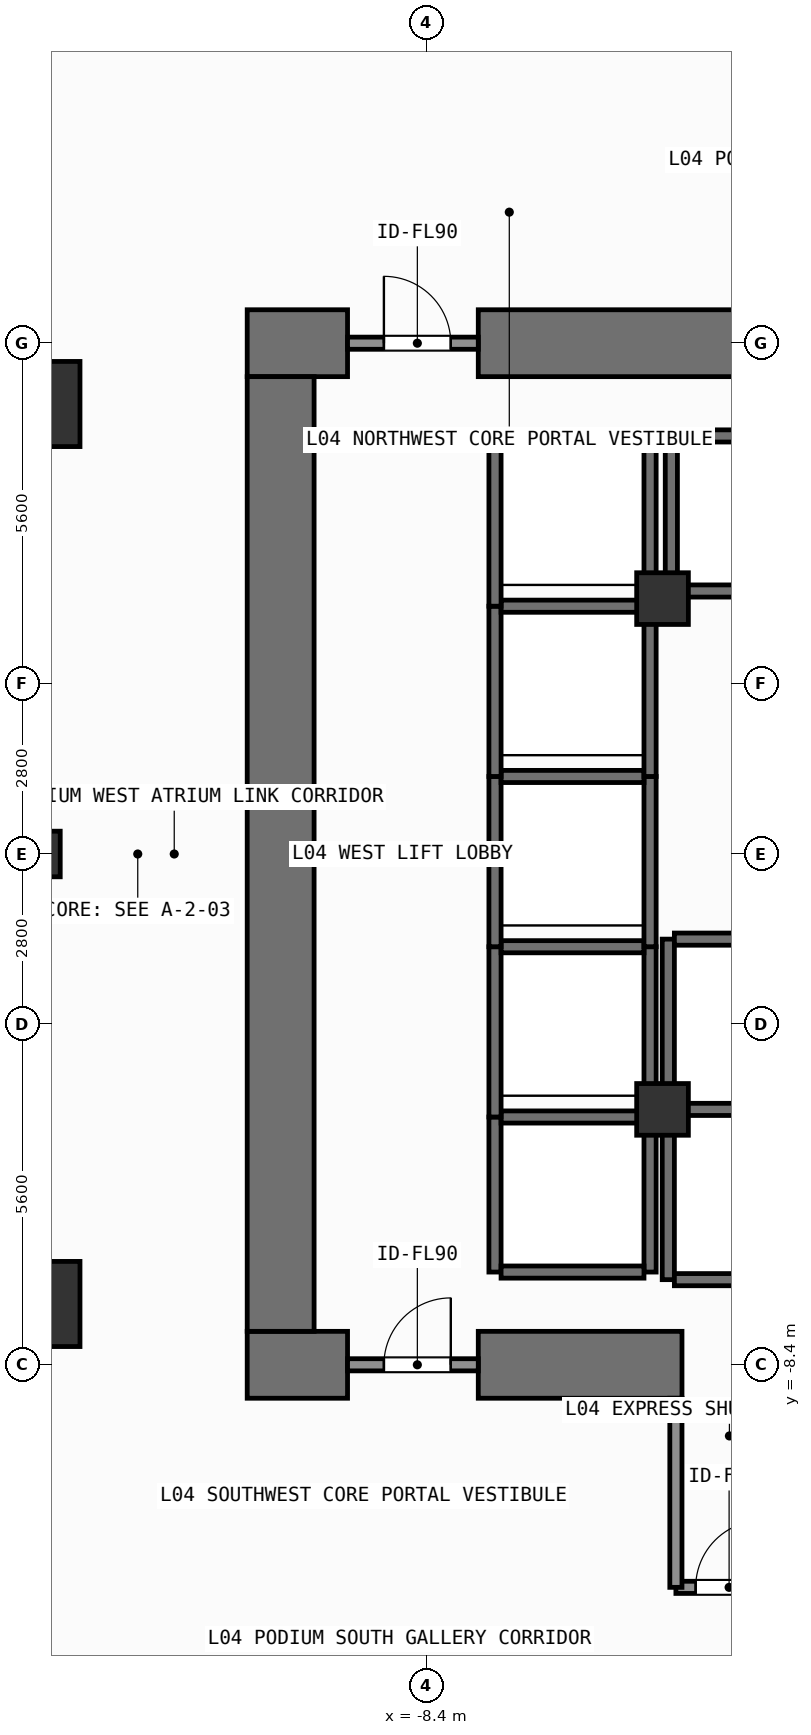
"""IFC4 building model, lengths in metres.
Left out: names, types, materials, properties, quantities, classifications, styles, units other than length and angle.
Written with IfcOpenShell. Run it as: python <this file> out.ifc"""

import sys

from ifc_helpers import new_model, si_unit, direction, frame, frame_2d, origin, origin_2d, place, context, subcontext, project, spatial, rectangle, extrude, element, fill, save


model = new_model("IFC4")
c1 = context("Model", 3, precision=1e-05, world=origin(), true_north=direction((0.0, 1.0)))
c2 = subcontext(c1, "Body", "Model", "MODEL_VIEW")
j1 = project(units=[si_unit("LENGTHUNIT", "METRE"), si_unit("PLANEANGLEUNIT", "RADIAN")], contexts=[c1])
p1 = place(None, origin())
s1 = spatial("IfcSite", under=j1, at=p1, CompositionType="ELEMENT")
p2 = place(p1, origin())
s2 = spatial("IfcBuilding", under=s1, at=p2, CompositionType="ELEMENT")
p3 = place(p2, frame((0.0, 0.0, 13.2)))
s3 = spatial("IfcBuildingStorey", under=s2, at=p3, CompositionType="ELEMENT", Elevation=13.2)
p4 = place(p3, frame((-11.35, -8.4, 0.0), z_axis=(0.0, 0.0, 1.0), x_axis=(1.0, 0.0, 0.0)))
e1 = element("IfcWall", 1, at=p4, inside=s3, PredefinedType="SHEAR", context=c2, shape_type="SweptSolid", body=[
    extrude(rectangle(XDim=1.65, YDim=1.1, at=frame_2d((0.825, 0.0))), origin(), (0.0, 0.0, 1.0), 4.2),
])
p5 = place(p3, frame((-7.55, -8.4, 0.0), z_axis=(0.0, 0.0, 1.0), x_axis=(1.0, 0.0, 0.0)))
e2 = element("IfcWall", 2, at=p5, inside=s3, PredefinedType="SHEAR", context=c2, shape_type="SweptSolid", body=[
    extrude(rectangle(XDim=3.35, YDim=1.1, at=frame_2d((1.675, 0.0))), origin(), (0.0, 0.0, 1.0), 4.2),
])
p6 = place(p3, frame((-11.35, 8.4, 0.0), z_axis=(0.0, 0.0, 1.0), x_axis=(1.0, 0.0, 0.0)))
e3 = element("IfcWall", 3, at=p6, inside=s3, PredefinedType="SHEAR", context=c2, shape_type="SweptSolid", body=[
    extrude(rectangle(XDim=1.65, YDim=1.1, at=frame_2d((0.825, 0.0))), origin(), (0.0, 0.0, 1.0), 4.2),
])
p7 = place(p3, frame((-7.55, 8.4, 0.0), z_axis=(0.0, 0.0, 1.0), x_axis=(1.0, 0.0, 0.0)))
e4 = element("IfcWall", 4, at=p7, inside=s3, PredefinedType="SHEAR", context=c2, shape_type="SweptSolid", body=[
    extrude(rectangle(XDim=16.5, YDim=1.1, at=frame_2d((8.25, 0.0))), origin(), (0.0, 0.0, 1.0), 4.2),
])
p8 = place(p3, frame((-10.8, -7.85, 0.0), z_axis=(0.0, 0.0, 1.0), x_axis=(0.0, 1.0, 0.0)))
e5 = element("IfcWall", 5, at=p8, inside=s3, PredefinedType="SHEAR", context=c2, shape_type="SweptSolid", body=[
    extrude(rectangle(XDim=15.7, YDim=1.1, at=frame_2d((7.85, 0.0))), origin(), (0.0, 0.0, 1.0), 4.2),
])
for number, where, z_axis, x_axis in (
    (6, (-14.8, -7.4, 0.0), (0.0, 0.0, 1.0), (1.0, 0.0, 0.0)),
    (7, (-14.8, 7.4, 0.0), (0.0, 0.0, 1.0), (1.0, 0.0, 0.0)),
):
    element("IfcColumn", number, at=place(p3, frame(where, z_axis=z_axis, x_axis=x_axis)), inside=s3, PredefinedType="COLUMN", context=c2, shape_type="SweptSolid", body=[
        extrude(rectangle(XDim=1.4, YDim=1.4, at=origin_2d()), origin(), (0.0, 0.0, 1.0), 4.2),
    ])
for number, where, z_axis, x_axis in (
    (8, (-4.52, -4.2, 0.0), (0.0, 0.0, 1.0), (1.0, 0.0, 0.0)),
    (9, (-4.52, 4.2, 0.0), (0.0, 0.0, 1.0), (1.0, 0.0, 0.0)),
):
    element("IfcColumn", number, at=place(p3, frame(where, z_axis=z_axis, x_axis=x_axis)), inside=s3, PredefinedType="COLUMN", context=c2, shape_type="SweptSolid", body=[
        extrude(rectangle(XDim=0.85, YDim=0.85, at=origin_2d()), origin(), (0.0, 0.0, 1.0), 4.2),
    ])
p9 = place(p3, frame((-14.8, 0.0, 0.0), z_axis=(0.0, 0.0, 1.0), x_axis=(1.0, 0.0, 0.0)))
e10 = element("IfcColumn", 10, at=p9, inside=s3, PredefinedType="COLUMN", context=c2, shape_type="SweptSolid", body=[
    extrude(rectangle(XDim=0.75, YDim=0.75, at=origin_2d()), origin(), (0.0, 0.0, 1.0), 4.2),
])
for number, where, z_axis, x_axis in (
    (11, (-7.275, -6.875, 0.0), (0.0, 0.0, 1.0), (0.0, 1.0, 0.0)),
    (12, (-4.725, -6.875, 0.0), (0.0, 0.0, 1.0), (0.0, 1.0, 0.0)),
):
    element("IfcWall", number, at=place(p3, frame(where, z_axis=z_axis, x_axis=x_axis)), inside=s3, PredefinedType="SHEAR", context=c2, shape_type="SweptSolid", body=[
        extrude(rectangle(XDim=2.55, YDim=0.2, at=frame_2d((1.275, 0.0))), origin(), (0.0, 0.0, 1.0), 3.96),
    ])
for number, where, z_axis, x_axis in (
    (13, (-7.175, -6.875, 0.0), (0.0, 0.0, 1.0), (1.0, 0.0, 0.0)),
    (14, (-7.175, -4.325, 0.0), (0.0, 0.0, 1.0), (1.0, 0.0, 0.0)),
):
    element("IfcWall", number, at=place(p3, frame(where, z_axis=z_axis, x_axis=x_axis)), inside=s3, PredefinedType="SHEAR", context=c2, shape_type="SweptSolid", body=[
        extrude(rectangle(XDim=2.35, YDim=0.2, at=frame_2d((1.175, 0.0))), origin(), (0.0, 0.0, 1.0), 3.96),
    ])
for number, where, z_axis, x_axis in (
    (15, (-7.275, -4.325, 0.0), (0.0, 0.0, 1.0), (0.0, 1.0, 0.0)),
    (16, (-4.725, -4.325, 0.0), (0.0, 0.0, 1.0), (0.0, 1.0, 0.0)),
):
    element("IfcWall", number, at=place(p3, frame(where, z_axis=z_axis, x_axis=x_axis)), inside=s3, PredefinedType="SHEAR", context=c2, shape_type="SweptSolid", body=[
        extrude(rectangle(XDim=2.8, YDim=0.2, at=frame_2d((1.4, 0.0))), origin(), (0.0, 0.0, 1.0), 3.96),
    ])
p10 = place(p3, frame((-7.175, -1.525, 0.0), z_axis=(0.0, 0.0, 1.0), x_axis=(1.0, 0.0, 0.0)))
e17 = element("IfcWall", 17, at=p10, inside=s3, PredefinedType="SHEAR", context=c2, shape_type="SweptSolid", body=[
    extrude(rectangle(XDim=2.35, YDim=0.2, at=frame_2d((1.175, 0.0))), origin(), (0.0, 0.0, 1.0), 3.96),
])
for number, where, z_axis, x_axis in (
    (18, (-7.275, -1.525, 0.0), (0.0, 0.0, 1.0), (0.0, 1.0, 0.0)),
    (19, (-4.725, -1.525, 0.0), (0.0, 0.0, 1.0), (0.0, 1.0, 0.0)),
):
    element("IfcWall", number, at=place(p3, frame(where, z_axis=z_axis, x_axis=x_axis)), inside=s3, PredefinedType="SHEAR", context=c2, shape_type="SweptSolid", body=[
        extrude(rectangle(XDim=2.8, YDim=0.2, at=frame_2d((1.4, 0.0))), origin(), (0.0, 0.0, 1.0), 3.96),
    ])
p11 = place(p3, frame((-7.175, 1.275, 0.0), z_axis=(0.0, 0.0, 1.0), x_axis=(1.0, 0.0, 0.0)))
e20 = element("IfcWall", 20, at=p11, inside=s3, PredefinedType="SHEAR", context=c2, shape_type="SweptSolid", body=[
    extrude(rectangle(XDim=2.35, YDim=0.2, at=frame_2d((1.175, 0.0))), origin(), (0.0, 0.0, 1.0), 3.96),
])
for number, where, z_axis, x_axis in (
    (21, (-7.275, 1.275, 0.0), (0.0, 0.0, 1.0), (0.0, 1.0, 0.0)),
    (22, (-4.725, 1.275, 0.0), (0.0, 0.0, 1.0), (0.0, 1.0, 0.0)),
):
    element("IfcWall", number, at=place(p3, frame(where, z_axis=z_axis, x_axis=x_axis)), inside=s3, PredefinedType="SHEAR", context=c2, shape_type="SweptSolid", body=[
        extrude(rectangle(XDim=2.8, YDim=0.2, at=frame_2d((1.4, 0.0))), origin(), (0.0, 0.0, 1.0), 3.96),
    ])
p12 = place(p3, frame((-7.175, 4.075, 0.0), z_axis=(0.0, 0.0, 1.0), x_axis=(1.0, 0.0, 0.0)))
e23 = element("IfcWall", 23, at=p12, inside=s3, PredefinedType="SHEAR", context=c2, shape_type="SweptSolid", body=[
    extrude(rectangle(XDim=2.35, YDim=0.2, at=frame_2d((1.175, 0.0))), origin(), (0.0, 0.0, 1.0), 3.96),
])
for number, where, z_axis, x_axis in (
    (24, (-7.275, 4.075, 0.0), (0.0, 0.0, 1.0), (0.0, 1.0, 0.0)),
    (25, (-4.725, 4.075, 0.0), (0.0, 0.0, 1.0), (0.0, 1.0, 0.0)),
):
    element("IfcWall", number, at=place(p3, frame(where, z_axis=z_axis, x_axis=x_axis)), inside=s3, PredefinedType="SHEAR", context=c2, shape_type="SweptSolid", body=[
        extrude(rectangle(XDim=2.8, YDim=0.2, at=frame_2d((1.4, 0.0))), origin(), (0.0, 0.0, 1.0), 3.96),
    ])
p13 = place(p3, frame((-7.175, 6.875, 0.0), z_axis=(0.0, 0.0, 1.0), x_axis=(1.0, 0.0, 0.0)))
e26 = element("IfcWall", 26, at=p13, inside=s3, PredefinedType="SHEAR", context=c2, shape_type="SweptSolid", body=[
    extrude(rectangle(XDim=2.35, YDim=0.2, at=frame_2d((1.175, 0.0))), origin(), (0.0, 0.0, 1.0), 3.96),
])
p14 = place(p3, frame((-4.375, 4.325, 0.0), z_axis=(0.0, 0.0, 1.0), x_axis=(0.0, 1.0, 0.0)))
e27 = element("IfcWall", 27, at=p14, inside=s3, PredefinedType="SHEAR", context=c2, shape_type="SweptSolid", body=[
    extrude(rectangle(XDim=2.55, YDim=0.2, at=frame_2d((1.275, 0.0))), origin(), (0.0, 0.0, 1.0), 3.96),
])
for number, where, z_axis, x_axis in (
    (28, (-4.275, 4.325, 0.0), (0.0, 0.0, 1.0), (1.0, 0.0, 0.0)),
    (29, (-4.275, 6.875, 0.0), (0.0, 0.0, 1.0), (1.0, 0.0, 0.0)),
):
    element("IfcWall", number, at=place(p3, frame(where, z_axis=z_axis, x_axis=x_axis)), inside=s3, PredefinedType="SHEAR", context=c2, shape_type="SweptSolid", body=[
        extrude(rectangle(XDim=2.35, YDim=0.2, at=frame_2d((1.175, 0.0))), origin(), (0.0, 0.0, 1.0), 3.96),
    ])
p15 = place(p3, frame((-4.425, -7.0, 0.0), z_axis=(0.0, 0.0, 1.0), x_axis=(0.0, 1.0, 0.0)))
e30 = element("IfcWall", 30, at=p15, inside=s3, PredefinedType="SHEAR", context=c2, shape_type="SweptSolid", body=[
    extrude(rectangle(XDim=2.8, YDim=0.2, at=frame_2d((1.4, 0.0))), origin(), (0.0, 0.0, 1.0), 3.96),
])
for number, where, z_axis, x_axis in (
    (31, (-4.325, -7.0, 0.0), (0.0, 0.0, 1.0), (1.0, 0.0, 0.0)),
    (32, (-4.325, -4.2, 0.0), (0.0, 0.0, 1.0), (1.0, 0.0, 0.0)),
):
    element("IfcWall", number, at=place(p3, frame(where, z_axis=z_axis, x_axis=x_axis)), inside=s3, PredefinedType="SHEAR", context=c2, shape_type="SweptSolid", body=[
        extrude(rectangle(XDim=2.45, YDim=0.2, at=frame_2d((1.225, 0.0))), origin(), (0.0, 0.0, 1.0), 3.96),
    ])
p16 = place(p3, frame((-4.425, -4.2, 0.0), z_axis=(0.0, 0.0, 1.0), x_axis=(0.0, 1.0, 0.0)))
e33 = element("IfcWall", 33, at=p16, inside=s3, PredefinedType="SHEAR", context=c2, shape_type="SweptSolid", body=[
    extrude(rectangle(XDim=2.8, YDim=0.2, at=frame_2d((1.4, 0.0))), origin(), (0.0, 0.0, 1.0), 3.96),
])
p17 = place(p3, frame((-4.325, -1.4, 0.0), z_axis=(0.0, 0.0, 1.0), x_axis=(1.0, 0.0, 0.0)))
e34 = element("IfcWall", 34, at=p17, inside=s3, PredefinedType="SHEAR", context=c2, shape_type="SweptSolid", body=[
    extrude(rectangle(XDim=2.45, YDim=0.2, at=frame_2d((1.225, 0.0))), origin(), (0.0, 0.0, 1.0), 3.96),
])
p18 = place(p3, frame((-9.7, -8.4, 0.0), z_axis=(0.0, 0.0, 1.0), x_axis=(1.0, 0.0, 0.0)))
e35 = element("IfcWall", 35, at=p18, inside=s3, PredefinedType="SOLIDWALL", context=c2, shape_type="SweptSolid", body=[
    extrude(rectangle(XDim=2.15, YDim=0.2, at=frame_2d((1.075, 0.0))), origin(), (0.0, 0.0, 1.0), 3.0),
])
p19 = place(p18, frame((0.598, 0.0, 0.0)))
e36 = element("IfcOpeningElement", 36, at=p19, cuts=e35, PredefinedType="OPENING", context=c2, shape_type="SweptSolid", body=[
    extrude(rectangle(XDim=1.1, YDim=2.15, at=frame_2d((0.55, 1.075))), frame((0.0, 0.11, 0.0), z_axis=(0.0, -1.0, 0.0), x_axis=(1.0, 0.0, 0.0)), (0.0, 0.0, 1.0), 0.22),
])
p20 = place(p3, frame((-9.7, 8.4, 0.0), z_axis=(0.0, 0.0, 1.0), x_axis=(1.0, 0.0, 0.0)))
e37 = element("IfcWall", 37, at=p20, inside=s3, PredefinedType="SOLIDWALL", context=c2, shape_type="SweptSolid", body=[
    extrude(rectangle(XDim=2.15, YDim=0.2, at=frame_2d((1.075, 0.0))), origin(), (0.0, 0.0, 1.0), 3.0),
])
p21 = place(p20, frame((0.598, 0.0, 0.0)))
e38 = element("IfcOpeningElement", 38, at=p21, cuts=e37, PredefinedType="OPENING", context=c2, shape_type="SweptSolid", body=[
    extrude(rectangle(XDim=1.1, YDim=2.15, at=frame_2d((0.55, 1.075))), frame((0.0, 0.11, 0.0), z_axis=(0.0, -1.0, 0.0), x_axis=(1.0, 0.0, 0.0)), (0.0, 0.0, 1.0), 0.22),
])
p22 = place(p3, frame((-4.3, -12.06, 0.0), z_axis=(0.0, 0.0, 1.0), x_axis=(1.0, 0.0, 0.0)))
e39 = element("IfcWall", 39, at=p22, inside=s3, PredefinedType="SOLIDWALL", context=c2, shape_type="SweptSolid", body=[
    extrude(rectangle(XDim=1.75, YDim=0.2, at=frame_2d((0.875, 0.0))), origin(), (0.0, 0.0, 1.0), 3.96),
])
p23 = place(p22, frame((0.325, 0.0, 0.0)))
e40 = element("IfcOpeningElement", 40, at=p23, cuts=e39, PredefinedType="OPENING", context=c2, shape_type="SweptSolid", body=[
    extrude(rectangle(XDim=1.1, YDim=2.15, at=frame_2d((0.55, 1.075))), frame((0.0, 0.11, 0.0), z_axis=(0.0, -1.0, 0.0), x_axis=(1.0, 0.0, 0.0)), (0.0, 0.0, 1.0), 0.22),
])
p24 = place(p3, frame((-4.3, -12.06, 0.0), z_axis=(0.0, 0.0, 1.0), x_axis=(0.0, 1.0, 0.0)))
e41 = element("IfcWall", 41, at=p24, inside=s3, PredefinedType="SOLIDWALL", context=c2, shape_type="SweptSolid", body=[
    extrude(rectangle(XDim=3.11, YDim=0.2, at=frame_2d((1.555, 0.0))), origin(), (0.0, 0.0, 1.0), 3.96),
])
p25 = place(p19, origin())
e42 = element("IfcDoor", 42, at=p25, inside=s3, OperationType="SINGLE_SWING_RIGHT", PredefinedType="DOOR", context=c2, shape_type="SweptSolid", body=[
    extrude(rectangle(XDim=1.1, YDim=2.15, at=frame_2d((0.55, 1.075))), frame((0.0, 0.025, 0.0), z_axis=(0.0, -1.0, 0.0), x_axis=(1.0, 0.0, 0.0)), (0.0, 0.0, 1.0), 0.05),
])
fill(e36, e42)
p26 = place(p21, origin())
e43 = element("IfcDoor", 43, at=p26, inside=s3, OperationType="SINGLE_SWING_LEFT", PredefinedType="DOOR", context=c2, shape_type="SweptSolid", body=[
    extrude(rectangle(XDim=1.1, YDim=2.15, at=frame_2d((0.55, 1.075))), frame((0.0, 0.025, 0.0), z_axis=(0.0, -1.0, 0.0), x_axis=(1.0, 0.0, 0.0)), (0.0, 0.0, 1.0), 0.05),
])
fill(e38, e43)
p27 = place(p23, origin())
e44 = element("IfcDoor", 44, at=p27, inside=s3, OperationType="SINGLE_SWING_RIGHT", PredefinedType="DOOR", context=c2, shape_type="SweptSolid", body=[
    extrude(rectangle(XDim=1.1, YDim=2.15, at=frame_2d((0.55, 1.075))), frame((0.0, 0.025, 0.0), z_axis=(0.0, -1.0, 0.0), x_axis=(1.0, 0.0, 0.0)), (0.0, 0.0, 1.0), 0.05),
])
fill(e40, e44)
save(model, sys.argv[1])
